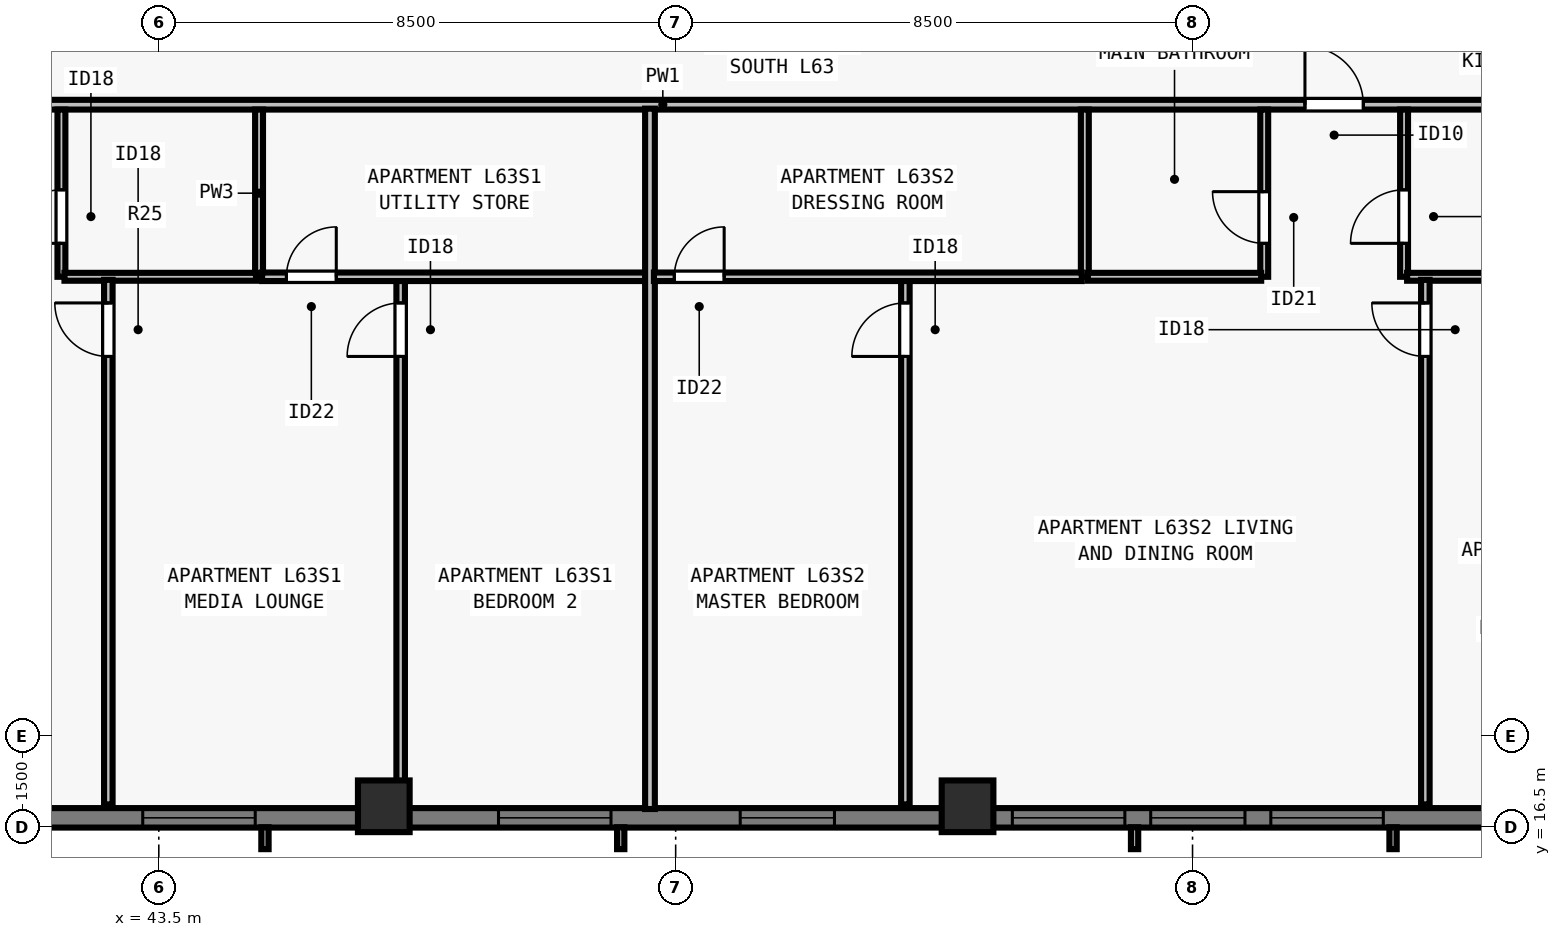
"""IFC4 building model, lengths in metres.
Left out: names, types, materials, properties, quantities, classifications, styles, units other than length and angle.
Written with IfcOpenShell. Run it as: python <this file> out.ifc"""

import sys

from ifc_helpers import new_model, si_unit, direction, frame, frame_2d, origin, origin_2d, place, context, subcontext, project, spatial, rectangle, extrude, element, fill, save


model = new_model("IFC4")
c1 = context("Model", 3, precision=1e-05, world=origin(), true_north=direction((0.0, 1.0)))
c2 = subcontext(c1, "Body", "Model", "MODEL_VIEW")
j1 = project(units=[si_unit("LENGTHUNIT", "METRE"), si_unit("PLANEANGLEUNIT", "RADIAN")], contexts=[c1])
p1 = place(None, origin())
s1 = spatial("IfcSite", under=j1, at=p1, CompositionType="ELEMENT")
p2 = place(p1, origin())
s2 = spatial("IfcBuilding", under=s1, at=p2, CompositionType="ELEMENT")
p3 = place(p2, frame((0.0, 0.0, 230.5)))
s3 = spatial("IfcBuildingStorey", under=s2, at=p3, CompositionType="ELEMENT", Elevation=230.5)
for number, where, z_axis, x_axis in (
    (1, (47.2, 16.85, 0.0), (0.0, 0.0, 1.0), (1.0, 0.0, 0.0)),
    (2, (56.8, 16.85, 0.0), (0.0, 0.0, 1.0), (1.0, 0.0, 0.0)),
):
    element("IfcColumn", number, at=place(p3, frame(where, z_axis=z_axis, x_axis=x_axis)), inside=s3, PredefinedType="COLUMN", context=c2, shape_type="SweptSolid", body=[
        extrude(rectangle(XDim=0.85, YDim=0.85, at=origin_2d()), origin(), (0.0, 0.0, 1.0), 3.5),
    ])
p4 = place(p3, frame((69.5, 16.66, 0.0), z_axis=(0.0, 0.0, 1.0), x_axis=(-1.0, 0.0, 0.0)))
e3 = element("IfcWall", 3, at=p4, inside=s3, PredefinedType="SOLIDWALL", context=c2, shape_type="SweptSolid", body=[
    extrude(rectangle(XDim=34.702, YDim=0.32, at=frame_2d((17.351, 0.0))), origin(), (0.0, 0.0, 1.0), 3.29),
])
p5 = place(p4, frame((5.863, 0.0, 0.8)))
e4 = element("IfcOpeningElement", 4, at=p5, cuts=e3, PredefinedType="OPENING", context=c2, shape_type="SweptSolid", body=[
    extrude(rectangle(XDim=1.85, YDim=1.678, at=frame_2d((0.925, 0.839))), frame((0.0, 0.17, 0.0), z_axis=(0.0, -1.0, 0.0), x_axis=(1.0, 0.0, 0.0)), (0.0, 0.0, 1.0), 0.34),
])
p6 = place(p4, frame((8.138, 0.0, 0.8)))
e5 = element("IfcOpeningElement", 5, at=p6, cuts=e3, PredefinedType="OPENING", context=c2, shape_type="SweptSolid", body=[
    extrude(rectangle(XDim=1.55, YDim=1.678, at=frame_2d((0.775, 0.839))), frame((0.0, 0.17, 0.0), z_axis=(0.0, -1.0, 0.0), x_axis=(1.0, 0.0, 0.0)), (0.0, 0.0, 1.0), 0.34),
])
p7 = place(p4, frame((10.113, 0.0, 0.8)))
e6 = element("IfcOpeningElement", 6, at=p7, cuts=e3, PredefinedType="OPENING", context=c2, shape_type="SweptSolid", body=[
    extrude(rectangle(XDim=1.85, YDim=1.678, at=frame_2d((0.925, 0.839))), frame((0.0, 0.17, 0.0), z_axis=(0.0, -1.0, 0.0), x_axis=(1.0, 0.0, 0.0)), (0.0, 0.0, 1.0), 0.34),
])
p8 = place(p4, frame((14.888, 0.0, 0.8)))
e7 = element("IfcOpeningElement", 7, at=p8, cuts=e3, PredefinedType="OPENING", context=c2, shape_type="SweptSolid", body=[
    extrude(rectangle(XDim=1.55, YDim=1.678, at=frame_2d((0.775, 0.839))), frame((0.0, 0.17, 0.0), z_axis=(0.0, -1.0, 0.0), x_axis=(1.0, 0.0, 0.0)), (0.0, 0.0, 1.0), 0.34),
])
p9 = place(p4, frame((18.564, 0.0, 0.8)))
e8 = element("IfcOpeningElement", 8, at=p9, cuts=e3, PredefinedType="OPENING", context=c2, shape_type="SweptSolid", body=[
    extrude(rectangle(XDim=1.85, YDim=1.678, at=frame_2d((0.925, 0.839))), frame((0.0, 0.17, 0.0), z_axis=(0.0, -1.0, 0.0), x_axis=(1.0, 0.0, 0.0)), (0.0, 0.0, 1.0), 0.34),
])
p10 = place(p4, frame((24.414, 0.0, 0.8)))
e9 = element("IfcOpeningElement", 9, at=p10, cuts=e3, PredefinedType="OPENING", context=c2, shape_type="SweptSolid", body=[
    extrude(rectangle(XDim=1.85, YDim=1.678, at=frame_2d((0.925, 0.839))), frame((0.0, 0.17, 0.0), z_axis=(0.0, -1.0, 0.0), x_axis=(1.0, 0.0, 0.0)), (0.0, 0.0, 1.0), 0.34),
])
p11 = place(p4, frame((28.389, 0.0, 0.8)))
e10 = element("IfcOpeningElement", 10, at=p11, cuts=e3, PredefinedType="OPENING", context=c2, shape_type="SweptSolid", body=[
    extrude(rectangle(XDim=1.55, YDim=1.678, at=frame_2d((0.775, 0.839))), frame((0.0, 0.17, 0.0), z_axis=(0.0, -1.0, 0.0), x_axis=(1.0, 0.0, 0.0)), (0.0, 0.0, 1.0), 0.34),
])
p12 = place(p3, frame((29.805, 28.387, 0.0), z_axis=(0.0, 0.0, 1.0), x_axis=(1.0, 0.0, 0.0)))
e11 = element("IfcWall", 11, at=p12, inside=s3, PredefinedType="PARTITIONING", context=c2, shape_type="SweptSolid", body=[
    extrude(rectangle(XDim=44.39, YDim=0.16, at=frame_2d((22.195, 0.0))), origin(), (0.0, 0.0, 1.0), 2.958),
])
p13 = place(p12, frame((10.464, 0.0, 0.0)))
e12 = element("IfcOpeningElement", 12, at=p13, cuts=e11, PredefinedType="OPENING", context=c2, shape_type="SweptSolid", body=[
    extrude(rectangle(XDim=0.96, YDim=2.18, at=frame_2d((0.48, 1.09))), frame((0.0, 0.09, 0.0), z_axis=(0.0, -1.0, 0.0), x_axis=(1.0, 0.0, 0.0)), (0.0, 0.0, 1.0), 0.18),
])
p14 = place(p12, frame((32.544, 0.0, 0.0)))
e13 = element("IfcOpeningElement", 13, at=p14, cuts=e11, PredefinedType="OPENING", context=c2, shape_type="SweptSolid", body=[
    extrude(rectangle(XDim=0.96, YDim=2.18, at=frame_2d((0.48, 1.09))), frame((0.0, 0.09, 0.0), z_axis=(0.0, -1.0, 0.0), x_axis=(1.0, 0.0, 0.0)), (0.0, 0.0, 1.0), 0.18),
])
p15 = place(p3, frame((45.149, 25.558, 0.0), z_axis=(0.0, 0.0, 1.0), x_axis=(0.0, 1.0, 0.0)))
e14 = element("IfcWall", 14, at=p15, inside=s3, PredefinedType="PLUMBINGWALL", context=c2, shape_type="SweptSolid", body=[
    extrude(rectangle(XDim=2.75, YDim=0.13, at=frame_2d((1.375, 0.0))), origin(), (0.0, 0.0, 1.0), 3.29),
])
p16 = place(p3, frame((41.899, 25.558, 0.0), z_axis=(0.0, 0.0, 1.0), x_axis=(0.0, 1.0, 0.0)))
e15 = element("IfcWall", 15, at=p16, inside=s3, PredefinedType="PLUMBINGWALL", context=c2, shape_type="SweptSolid", body=[
    extrude(rectangle(XDim=2.75, YDim=0.13, at=frame_2d((1.375, 0.0))), origin(), (0.0, 0.0, 1.0), 2.573),
])
p17 = place(p16, frame((0.55, 0.0, 0.0)))
e16 = element("IfcOpeningElement", 16, at=p17, cuts=e15, PredefinedType="OPENING", context=c2, shape_type="SweptSolid", body=[
    extrude(rectangle(XDim=0.88, YDim=2.1, at=frame_2d((0.44, 1.05))), frame((0.0, 0.075, 0.0), z_axis=(0.0, -1.0, 0.0), x_axis=(1.0, 0.0, 0.0)), (0.0, 0.0, 1.0), 0.15),
])
p18 = place(p3, frame((41.949, 25.558, 0.0), z_axis=(0.0, 0.0, 1.0), x_axis=(1.0, 0.0, 0.0)))
e17 = element("IfcWall", 17, at=p18, inside=s3, PredefinedType="PLUMBINGWALL", context=c2, shape_type="SweptSolid", body=[
    extrude(rectangle(XDim=3.15, YDim=0.13, at=frame_2d((1.575, 0.0))), origin(), (0.0, 0.0, 1.0), 3.29),
])
p19 = place(p3, frame((47.478, 16.88, 0.0), z_axis=(0.0, 0.0, 1.0), x_axis=(0.0, 1.0, 0.0)))
e18 = element("IfcWall", 18, at=p19, inside=s3, PredefinedType="PARTITIONING", context=c2, shape_type="SweptSolid", body=[
    extrude(rectangle(XDim=8.718, YDim=0.14, at=frame_2d((4.359, 0.0))), origin(), (0.0, 0.0, 1.0), 2.958),
])
p20 = place(p19, frame((7.367, 0.0, 0.0)))
e19 = element("IfcOpeningElement", 19, at=p20, cuts=e18, PredefinedType="OPENING", context=c2, shape_type="SweptSolid", body=[
    extrude(rectangle(XDim=0.88, YDim=2.1, at=frame_2d((0.44, 1.05))), frame((0.0, 0.08, 0.0), z_axis=(0.0, -1.0, 0.0), x_axis=(1.0, 0.0, 0.0)), (0.0, 0.0, 1.0), 0.16),
])
p21 = place(p3, frame((45.199, 25.558, 0.0), z_axis=(0.0, 0.0, 1.0), x_axis=(1.0, 0.0, 0.0)))
e20 = element("IfcWall", 20, at=p21, inside=s3, PredefinedType="PARTITIONING", context=c2, shape_type="SweptSolid", body=[
    extrude(rectangle(XDim=6.429, YDim=0.14, at=frame_2d((3.214, 0.0))), origin(), (0.0, 0.0, 1.0), 3.29),
])
p22 = place(p21, frame((0.4, 0.0, 0.0)))
e21 = element("IfcOpeningElement", 21, at=p22, cuts=e20, PredefinedType="OPENING", context=c2, shape_type="SweptSolid", body=[
    extrude(rectangle(XDim=0.82, YDim=2.1, at=frame_2d((0.41, 1.05))), frame((0.0, 0.08, 0.0), z_axis=(0.0, -1.0, 0.0), x_axis=(1.0, 0.0, 0.0)), (0.0, 0.0, 1.0), 0.16),
])
p23 = place(p3, frame((42.67, 16.88, 0.0), z_axis=(0.0, 0.0, 1.0), x_axis=(0.0, 1.0, 0.0)))
e22 = element("IfcWall", 22, at=p23, inside=s3, PredefinedType="PARTITIONING", context=c2, shape_type="SweptSolid", body=[
    extrude(rectangle(XDim=8.628, YDim=0.14, at=frame_2d((4.314, 0.0))), origin(), (0.0, 0.0, 1.0), 3.29),
])
p24 = place(p23, frame((7.367, 0.0, 0.0)))
e23 = element("IfcOpeningElement", 23, at=p24, cuts=e22, PredefinedType="OPENING", context=c2, shape_type="SweptSolid", body=[
    extrude(rectangle(XDim=0.88, YDim=2.1, at=frame_2d((0.44, 1.05))), frame((0.0, 0.08, 0.0), z_axis=(0.0, -1.0, 0.0), x_axis=(1.0, 0.0, 0.0)), (0.0, 0.0, 1.0), 0.16),
])
p25 = place(p3, frame((51.577, 16.805, 0.0), z_axis=(0.0, 0.0, 1.0), x_axis=(0.0, 1.0, 0.0)))
e24 = element("IfcWall", 24, at=p25, inside=s3, PredefinedType="PARTITIONING", context=c2, shape_type="SweptSolid", body=[
    extrude(rectangle(XDim=11.518, YDim=0.16, at=frame_2d((5.759, 0.0))), origin(), (0.0, 0.0, 1.0), 2.958),
])
p26 = place(p3, frame((58.729, 25.558, 0.0), z_axis=(0.0, 0.0, 1.0), x_axis=(0.0, 1.0, 0.0)))
e25 = element("IfcWall", 25, at=p26, inside=s3, PredefinedType="PLUMBINGWALL", context=c2, shape_type="SweptSolid", body=[
    extrude(rectangle(XDim=2.75, YDim=0.13, at=frame_2d((1.375, 0.0))), origin(), (0.0, 0.0, 1.0), 3.29),
])
p27 = place(p3, frame((61.679, 25.558, 0.0), z_axis=(0.0, 0.0, 1.0), x_axis=(0.0, 1.0, 0.0)))
e26 = element("IfcWall", 26, at=p27, inside=s3, PredefinedType="PLUMBINGWALL", context=c2, shape_type="SweptSolid", body=[
    extrude(rectangle(XDim=2.75, YDim=0.13, at=frame_2d((1.375, 0.0))), origin(), (0.0, 0.0, 1.0), 3.29),
])
p28 = place(p27, frame((0.55, 0.0, 0.0)))
e27 = element("IfcOpeningElement", 27, at=p28, cuts=e26, PredefinedType="OPENING", context=c2, shape_type="SweptSolid", body=[
    extrude(rectangle(XDim=0.85, YDim=2.08, at=frame_2d((0.425, 1.04))), frame((0.0, 0.075, 0.0), z_axis=(0.0, -1.0, 0.0), x_axis=(1.0, 0.0, 0.0)), (0.0, 0.0, 1.0), 0.15),
])
p29 = place(p3, frame((58.779, 25.558, 0.0), z_axis=(0.0, 0.0, 1.0), x_axis=(1.0, 0.0, 0.0)))
e28 = element("IfcWall", 28, at=p29, inside=s3, PredefinedType="PLUMBINGWALL", context=c2, shape_type="SweptSolid", body=[
    extrude(rectangle(XDim=2.85, YDim=0.13, at=frame_2d((1.425, 0.0))), origin(), (0.0, 0.0, 1.0), 3.29),
])
p30 = place(p3, frame((63.979, 25.558, 0.0), z_axis=(0.0, 0.0, 1.0), x_axis=(0.0, 1.0, 0.0)))
e29 = element("IfcWall", 29, at=p30, inside=s3, PredefinedType="PLUMBINGWALL", context=c2, shape_type="SweptSolid", body=[
    extrude(rectangle(XDim=2.75, YDim=0.13, at=frame_2d((1.375, 0.0))), origin(), (0.0, 0.0, 1.0), 3.29),
])
p31 = place(p30, frame((0.55, 0.0, 0.0)))
e30 = element("IfcOpeningElement", 30, at=p31, cuts=e29, PredefinedType="OPENING", context=c2, shape_type="SweptSolid", body=[
    extrude(rectangle(XDim=0.88, YDim=2.1, at=frame_2d((0.44, 1.05))), frame((0.0, 0.075, 0.0), z_axis=(0.0, -1.0, 0.0), x_axis=(1.0, 0.0, 0.0)), (0.0, 0.0, 1.0), 0.15),
])
p32 = place(p3, frame((64.029, 25.558, 0.0), z_axis=(0.0, 0.0, 1.0), x_axis=(1.0, 0.0, 0.0)))
e31 = element("IfcWall", 31, at=p32, inside=s3, PredefinedType="PLUMBINGWALL", context=c2, shape_type="SweptSolid", body=[
    extrude(rectangle(XDim=3.15, YDim=0.13, at=frame_2d((1.575, 0.0))), origin(), (0.0, 0.0, 1.0), 3.29),
])
p33 = place(p3, frame((55.778, 16.88, 0.0), z_axis=(0.0, 0.0, 1.0), x_axis=(0.0, 1.0, 0.0)))
e32 = element("IfcWall", 32, at=p33, inside=s3, PredefinedType="PARTITIONING", context=c2, shape_type="SweptSolid", body=[
    extrude(rectangle(XDim=8.718, YDim=0.14, at=frame_2d((4.359, 0.0))), origin(), (0.0, 0.0, 1.0), 3.29),
])
p34 = place(p33, frame((7.367, 0.0, 0.0)))
e33 = element("IfcOpeningElement", 33, at=p34, cuts=e32, PredefinedType="OPENING", context=c2, shape_type="SweptSolid", body=[
    extrude(rectangle(XDim=0.88, YDim=2.1, at=frame_2d((0.44, 1.05))), frame((0.0, 0.08, 0.0), z_axis=(0.0, -1.0, 0.0), x_axis=(1.0, 0.0, 0.0)), (0.0, 0.0, 1.0), 0.16),
])
p35 = place(p3, frame((51.643, 25.558, 0.0), z_axis=(0.0, 0.0, 1.0), x_axis=(1.0, 0.0, 0.0)))
e34 = element("IfcWall", 34, at=p35, inside=s3, PredefinedType="PARTITIONING", context=c2, shape_type="SweptSolid", body=[
    extrude(rectangle(XDim=7.036, YDim=0.14, at=frame_2d((3.518, 0.0))), origin(), (0.0, 0.0, 1.0), 3.29),
])
p36 = place(p35, frame((0.335, 0.0, 0.0)))
e35 = element("IfcOpeningElement", 35, at=p36, cuts=e34, PredefinedType="OPENING", context=c2, shape_type="SweptSolid", body=[
    extrude(rectangle(XDim=0.82, YDim=2.1, at=frame_2d((0.41, 1.05))), frame((0.0, 0.08, 0.0), z_axis=(0.0, -1.0, 0.0), x_axis=(1.0, 0.0, 0.0)), (0.0, 0.0, 1.0), 0.16),
])
p37 = place(p3, frame((64.329, 16.88, 0.0), z_axis=(0.0, 0.0, 1.0), x_axis=(0.0, 1.0, 0.0)))
e36 = element("IfcWall", 36, at=p37, inside=s3, PredefinedType="PARTITIONING", context=c2, shape_type="SweptSolid", body=[
    extrude(rectangle(XDim=8.628, YDim=0.14, at=frame_2d((4.314, 0.0))), origin(), (0.0, 0.0, 1.0), 2.573),
])
p38 = place(p37, frame((7.367, 0.0, 0.0)))
e37 = element("IfcOpeningElement", 37, at=p38, cuts=e36, PredefinedType="OPENING", context=c2, shape_type="SweptSolid", body=[
    extrude(rectangle(XDim=0.88, YDim=2.1, at=frame_2d((0.44, 1.05))), frame((0.0, 0.08, 0.0), z_axis=(0.0, -1.0, 0.0), x_axis=(1.0, 0.0, 0.0)), (0.0, 0.0, 1.0), 0.16),
])
p39 = place(p5, origin())
e38 = element("IfcWindow", 38, at=p39, inside=s3, PartitioningType="SINGLE_PANEL", PredefinedType="WINDOW", context=c2, shape_type="SweptSolid", body=[
    extrude(rectangle(XDim=1.85, YDim=1.678, at=frame_2d((0.925, 0.839))), frame((0.0, -0.05, 0.0), z_axis=(0.0, -1.0, 0.0), x_axis=(1.0, 0.0, 0.0)), (0.0, 0.0, 1.0), 0.06),
])
fill(e4, e38)
p40 = place(p6, origin())
e39 = element("IfcWindow", 39, at=p40, inside=s3, PartitioningType="SINGLE_PANEL", PredefinedType="WINDOW", context=c2, shape_type="SweptSolid", body=[
    extrude(rectangle(XDim=1.55, YDim=1.678, at=frame_2d((0.775, 0.839))), frame((0.0, -0.05, 0.0), z_axis=(0.0, -1.0, 0.0), x_axis=(1.0, 0.0, 0.0)), (0.0, 0.0, 1.0), 0.06),
])
fill(e5, e39)
p41 = place(p7, origin())
e40 = element("IfcWindow", 40, at=p41, inside=s3, PartitioningType="SINGLE_PANEL", PredefinedType="WINDOW", context=c2, shape_type="SweptSolid", body=[
    extrude(rectangle(XDim=1.85, YDim=1.678, at=frame_2d((0.925, 0.839))), frame((0.0, -0.05, 0.0), z_axis=(0.0, -1.0, 0.0), x_axis=(1.0, 0.0, 0.0)), (0.0, 0.0, 1.0), 0.06),
])
fill(e6, e40)
p42 = place(p8, origin())
e41 = element("IfcWindow", 41, at=p42, inside=s3, PartitioningType="SINGLE_PANEL", PredefinedType="WINDOW", context=c2, shape_type="SweptSolid", body=[
    extrude(rectangle(XDim=1.55, YDim=1.678, at=frame_2d((0.775, 0.839))), frame((0.0, -0.05, 0.0), z_axis=(0.0, -1.0, 0.0), x_axis=(1.0, 0.0, 0.0)), (0.0, 0.0, 1.0), 0.06),
])
fill(e7, e41)
p43 = place(p9, origin())
e42 = element("IfcWindow", 42, at=p43, inside=s3, PartitioningType="SINGLE_PANEL", PredefinedType="WINDOW", context=c2, shape_type="SweptSolid", body=[
    extrude(rectangle(XDim=1.85, YDim=1.678, at=frame_2d((0.925, 0.839))), frame((0.0, -0.05, 0.0), z_axis=(0.0, -1.0, 0.0), x_axis=(1.0, 0.0, 0.0)), (0.0, 0.0, 1.0), 0.06),
])
fill(e8, e42)
p44 = place(p10, origin())
e43 = element("IfcWindow", 43, at=p44, inside=s3, PartitioningType="SINGLE_PANEL", PredefinedType="WINDOW", context=c2, shape_type="SweptSolid", body=[
    extrude(rectangle(XDim=1.85, YDim=1.678, at=frame_2d((0.925, 0.839))), frame((0.0, -0.05, 0.0), z_axis=(0.0, -1.0, 0.0), x_axis=(1.0, 0.0, 0.0)), (0.0, 0.0, 1.0), 0.06),
])
fill(e9, e43)
p45 = place(p17, origin())
e44 = element("IfcDoor", 44, at=p45, inside=s3, OperationType="SINGLE_SWING_LEFT", PredefinedType="DOOR", context=c2, shape_type="SweptSolid", body=[
    extrude(rectangle(XDim=0.88, YDim=2.1, at=frame_2d((0.44, 1.05))), frame((0.0, 0.025, 0.0), z_axis=(0.0, -1.0, 0.0), x_axis=(1.0, 0.0, 0.0)), (0.0, 0.0, 1.0), 0.05),
])
fill(e16, e44)
p46 = place(p22, origin())
e45 = element("IfcDoor", 45, at=p46, inside=s3, OperationType="SINGLE_SWING_RIGHT", PredefinedType="DOOR", context=c2, shape_type="SweptSolid", body=[
    extrude(rectangle(XDim=0.82, YDim=2.1, at=frame_2d((0.41, 1.05))), frame((0.0, 0.025, 0.0), z_axis=(0.0, -1.0, 0.0), x_axis=(1.0, 0.0, 0.0)), (0.0, 0.0, 1.0), 0.05),
])
fill(e21, e45)
p47 = place(p20, origin())
e46 = element("IfcDoor", 46, at=p47, inside=s3, OperationType="SINGLE_SWING_LEFT", PredefinedType="DOOR", context=c2, shape_type="SweptSolid", body=[
    extrude(rectangle(XDim=0.88, YDim=2.1, at=frame_2d((0.44, 1.05))), frame((0.0, 0.025, 0.0), z_axis=(0.0, -1.0, 0.0), x_axis=(1.0, 0.0, 0.0)), (0.0, 0.0, 1.0), 0.05),
])
fill(e19, e46)
p48 = place(p24, origin())
e47 = element("IfcDoor", 47, at=p48, inside=s3, OperationType="SINGLE_SWING_RIGHT", PredefinedType="DOOR", context=c2, shape_type="SweptSolid", body=[
    extrude(rectangle(XDim=0.88, YDim=2.1, at=frame_2d((0.44, 1.05))), frame((0.0, 0.025, 0.0), z_axis=(0.0, -1.0, 0.0), x_axis=(1.0, 0.0, 0.0)), (0.0, 0.0, 1.0), 0.05),
])
fill(e23, e47)
p49 = place(p28, origin())
e48 = element("IfcDoor", 48, at=p49, inside=s3, OperationType="SINGLE_SWING_RIGHT", PredefinedType="DOOR", context=c2, shape_type="SweptSolid", body=[
    extrude(rectangle(XDim=0.85, YDim=2.08, at=frame_2d((0.425, 1.04))), frame((0.0, 0.025, 0.0), z_axis=(0.0, -1.0, 0.0), x_axis=(1.0, 0.0, 0.0)), (0.0, 0.0, 1.0), 0.05),
])
fill(e27, e48)
p50 = place(p31, origin())
e49 = element("IfcDoor", 49, at=p50, inside=s3, OperationType="SINGLE_SWING_LEFT", PredefinedType="DOOR", context=c2, shape_type="SweptSolid", body=[
    extrude(rectangle(XDim=0.88, YDim=2.1, at=frame_2d((0.44, 1.05))), frame((0.0, 0.025, 0.0), z_axis=(0.0, -1.0, 0.0), x_axis=(1.0, 0.0, 0.0)), (0.0, 0.0, 1.0), 0.05),
])
fill(e30, e49)
p51 = place(p36, origin())
e50 = element("IfcDoor", 50, at=p51, inside=s3, OperationType="SINGLE_SWING_RIGHT", PredefinedType="DOOR", context=c2, shape_type="SweptSolid", body=[
    extrude(rectangle(XDim=0.82, YDim=2.1, at=frame_2d((0.41, 1.05))), frame((0.0, 0.025, 0.0), z_axis=(0.0, -1.0, 0.0), x_axis=(1.0, 0.0, 0.0)), (0.0, 0.0, 1.0), 0.05),
])
fill(e35, e50)
p52 = place(p34, origin())
e51 = element("IfcDoor", 51, at=p52, inside=s3, OperationType="SINGLE_SWING_LEFT", PredefinedType="DOOR", context=c2, shape_type="SweptSolid", body=[
    extrude(rectangle(XDim=0.88, YDim=2.1, at=frame_2d((0.44, 1.05))), frame((0.0, 0.025, 0.0), z_axis=(0.0, -1.0, 0.0), x_axis=(1.0, 0.0, 0.0)), (0.0, 0.0, 1.0), 0.05),
])
fill(e33, e51)
p53 = place(p38, origin())
e52 = element("IfcDoor", 52, at=p53, inside=s3, OperationType="SINGLE_SWING_RIGHT", PredefinedType="DOOR", context=c2, shape_type="SweptSolid", body=[
    extrude(rectangle(XDim=0.88, YDim=2.1, at=frame_2d((0.44, 1.05))), frame((0.0, 0.025, 0.0), z_axis=(0.0, -1.0, 0.0), x_axis=(1.0, 0.0, 0.0)), (0.0, 0.0, 1.0), 0.05),
])
fill(e37, e52)
p54 = place(p14, origin())
e53 = element("IfcDoor", 53, at=p54, inside=s3, OperationType="SINGLE_SWING_LEFT", PredefinedType="DOOR", context=c2, shape_type="SweptSolid", body=[
    extrude(rectangle(XDim=0.96, YDim=2.18, at=frame_2d((0.48, 1.09))), frame((0.0, 0.025, 0.0), z_axis=(0.0, -1.0, 0.0), x_axis=(1.0, 0.0, 0.0)), (0.0, 0.0, 1.0), 0.05),
])
fill(e13, e53)
save(model, sys.argv[1])
